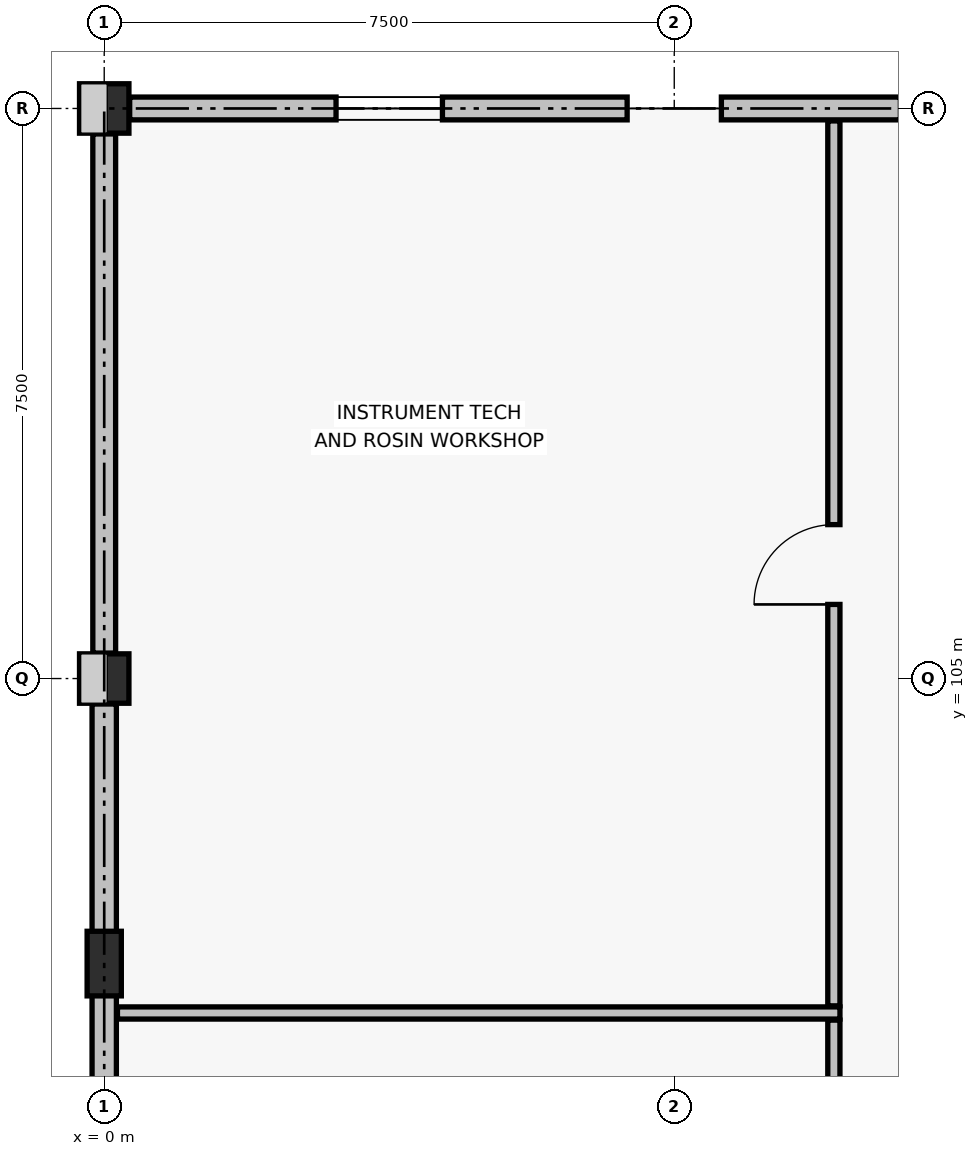
"""IFC4 building model, lengths in metres.
Left out: names, types, materials, properties, quantities, classifications, styles, units other than length and angle.
Written with IfcOpenShell. Run it as: python <this file> out.ifc"""

import sys

from ifc_helpers import new_model, si_unit, direction, frame, frame_2d, origin, origin_2d, place, context, subcontext, project, spatial, rectangle, extrude, element, fill, save


model = new_model("IFC4")
c1 = context("Model", 3, precision=1e-05, world=origin(), true_north=direction((0.0, 1.0)))
c2 = subcontext(c1, "Body", "Model", "MODEL_VIEW")
j1 = project(units=[si_unit("LENGTHUNIT", "METRE"), si_unit("PLANEANGLEUNIT", "RADIAN")], contexts=[c1])
p1 = place(None, origin())
s1 = spatial("IfcSite", under=j1, at=p1, CompositionType="ELEMENT")
p2 = place(p1, origin())
s2 = spatial("IfcBuilding", under=s1, at=p2, CompositionType="ELEMENT")
p3 = place(p2, frame((0.0, 0.0, 4.8)))
s3 = spatial("IfcBuildingStorey", under=s2, at=p3, CompositionType="ELEMENT", Elevation=4.8)
for number, where, z_axis, x_axis in (
    (1, (0.0, 105.0, 0.0), (0.0, 0.0, 1.0), (1.0, 0.0, 0.0)),
    (2, (0.0, 112.5, 0.0), (0.0, 0.0, 1.0), (1.0, 0.0, 0.0)),
):
    element("IfcColumn", number, at=place(p3, frame(where, z_axis=z_axis, x_axis=x_axis)), inside=s3, PredefinedType="COLUMN", context=c2, shape_type="SweptSolid", body=[
        extrude(rectangle(XDim=0.65, YDim=0.65, at=origin_2d()), origin(), (0.0, 0.0, 1.0), 4.2),
    ])
p4 = place(p3, frame((0.0, 101.25, 0.0), z_axis=(0.0, 0.0, 1.0), x_axis=(1.0, 0.0, 0.0)))
e3 = element("IfcColumn", 3, at=p4, inside=s3, PredefinedType="PILASTER", context=c2, shape_type="SweptSolid", body=[
    extrude(rectangle(XDim=0.45, YDim=0.85, at=origin_2d()), origin(), (0.0, 0.0, 1.0), 4.2),
])
p5 = place(p3, frame((0.335, 112.5, 0.0), z_axis=(0.0, 0.0, 1.0), x_axis=(1.0, 0.0, 0.0)))
e4 = element("IfcWall", 4, at=p5, inside=s3, PredefinedType="SOLIDWALL", context=c2, shape_type="SweptSolid", body=[
    extrude(rectangle(XDim=6.545, YDim=0.3, at=frame_2d((3.272, 0.0))), origin(), (0.0, 0.0, 1.0), 2.89),
])
p6 = place(p5, frame((2.715, 0.0, 0.6)))
e5 = element("IfcOpeningElement", 5, at=p6, cuts=e4, PredefinedType="OPENING", context=c2, shape_type="SweptSolid", body=[
    extrude(rectangle(XDim=1.4, YDim=1.8, at=frame_2d((0.7, 0.9))), frame((0.0, 0.16, 0.0), z_axis=(0.0, -1.0, 0.0), x_axis=(1.0, 0.0, 0.0)), (0.0, 0.0, 1.0), 0.32),
])
p7 = place(p3, frame((8.12, 112.5, 0.0), z_axis=(0.0, 0.0, 1.0), x_axis=(1.0, 0.0, 0.0)))
e6 = element("IfcWall", 6, at=p7, inside=s3, PredefinedType="SOLIDWALL", context=c2, shape_type="SweptSolid", body=[
    extrude(rectangle(XDim=6.545, YDim=0.3, at=frame_2d((3.272, 0.0))), origin(), (0.0, 0.0, 1.0), 2.89),
])
p8 = place(p7, frame((2.355, 0.0, 0.6)))
e7 = element("IfcOpeningElement", 7, at=p8, cuts=e6, PredefinedType="OPENING", context=c2, shape_type="SweptSolid", body=[
    extrude(rectangle(XDim=1.55, YDim=1.8, at=frame_2d((0.775, 0.9))), frame((0.0, 0.16, 0.0), z_axis=(0.0, -1.0, 0.0), x_axis=(1.0, 0.0, 0.0)), (0.0, 0.0, 1.0), 0.32),
])
p9 = place(p3, frame((0.0, 97.835, 0.0), z_axis=(0.0, 0.0, 1.0), x_axis=(0.0, 1.0, 0.0)))
e8 = element("IfcWall", 8, at=p9, inside=s3, PredefinedType="SOLIDWALL", context=c2, shape_type="SweptSolid", body=[
    extrude(rectangle(XDim=6.83, YDim=0.32, at=frame_2d((3.415, 0.0))), origin(), (0.0, 0.0, 1.0), 2.89),
])
p10 = place(p3, frame((0.0, 105.335, 0.0), z_axis=(0.0, 0.0, 1.0), x_axis=(0.0, 1.0, 0.0)))
e9 = element("IfcWall", 9, at=p10, inside=s3, PredefinedType="SOLIDWALL", context=c2, shape_type="SweptSolid", body=[
    extrude(rectangle(XDim=6.83, YDim=0.3, at=frame_2d((3.415, 0.0))), origin(), (0.0, 0.0, 1.0), 2.89),
])
p11 = place(p3, frame((0.174, 100.6, 0.0), z_axis=(0.0, 0.0, 1.0), x_axis=(1.0, 0.0, 0.0)))
e10 = element("IfcWall", 10, at=p11, inside=s3, PredefinedType="PARTITIONING", context=c2, shape_type="SweptSolid", body=[
    extrude(rectangle(XDim=9.506, YDim=0.16, at=frame_2d((4.753, 0.0))), origin(), (0.0, 0.0, 1.0), 3.14),
])
p12 = place(p3, frame((9.6, 97.594, 0.0), z_axis=(0.0, 0.0, 1.0), x_axis=(0.0, 1.0, 0.0)))
e11 = element("IfcWall", 11, at=p12, inside=s3, PredefinedType="PARTITIONING", context=c2, shape_type="SweptSolid", body=[
    extrude(rectangle(XDim=2.912, YDim=0.16, at=frame_2d((1.456, 0.0))), origin(), (0.0, 0.0, 1.0), 2.89),
])
p13 = place(p12, frame((0.981, 0.0, 0.0)))
e12 = element("IfcOpeningElement", 12, at=p13, cuts=e11, PredefinedType="OPENING", context=c2, shape_type="SweptSolid", body=[
    extrude(rectangle(XDim=0.95, YDim=2.1, at=frame_2d((0.475, 1.05))), frame((0.0, 0.09, 0.0), z_axis=(0.0, -1.0, 0.0), x_axis=(1.0, 0.0, 0.0)), (0.0, 0.0, 1.0), 0.18),
])
p14 = place(p3, frame((9.6, 100.694, 0.0), z_axis=(0.0, 0.0, 1.0), x_axis=(0.0, 1.0, 0.0)))
e13 = element("IfcWall", 13, at=p14, inside=s3, PredefinedType="PARTITIONING", context=c2, shape_type="SweptSolid", body=[
    extrude(rectangle(XDim=11.642, YDim=0.16, at=frame_2d((5.821, 0.0))), origin(), (0.0, 0.0, 1.0), 2.89),
])
p15 = place(p14, frame((5.281, 0.0, 0.0)))
e14 = element("IfcOpeningElement", 14, at=p15, cuts=e13, PredefinedType="OPENING", context=c2, shape_type="SweptSolid", body=[
    extrude(rectangle(XDim=1.05, YDim=2.12, at=frame_2d((0.525, 1.06))), frame((0.0, 0.09, 0.0), z_axis=(0.0, -1.0, 0.0), x_axis=(1.0, 0.0, 0.0)), (0.0, 0.0, 1.0), 0.18),
])
p16 = place(p6, origin())
e15 = element("IfcWindow", 15, at=p16, inside=s3, PartitioningType="SINGLE_PANEL", PredefinedType="WINDOW", context=c2, shape_type="SweptSolid", body=[
    extrude(rectangle(XDim=1.4, YDim=1.8, at=frame_2d((0.7, 0.9))), frame((0.0, 0.03, 0.0), z_axis=(0.0, -1.0, 0.0), x_axis=(1.0, 0.0, 0.0)), (0.0, 0.0, 1.0), 0.06),
])
fill(e5, e15)
p17 = place(p15, origin())
e16 = element("IfcDoor", 16, at=p17, inside=s3, OperationType="SINGLE_SWING_LEFT", PredefinedType="DOOR", context=c2, shape_type="SweptSolid", body=[
    extrude(rectangle(XDim=1.05, YDim=2.12, at=frame_2d((0.525, 1.06))), frame((0.0, 0.025, 0.0), z_axis=(0.0, -1.0, 0.0), x_axis=(1.0, 0.0, 0.0)), (0.0, 0.0, 1.0), 0.05),
])
fill(e14, e16)
save(model, sys.argv[1])
